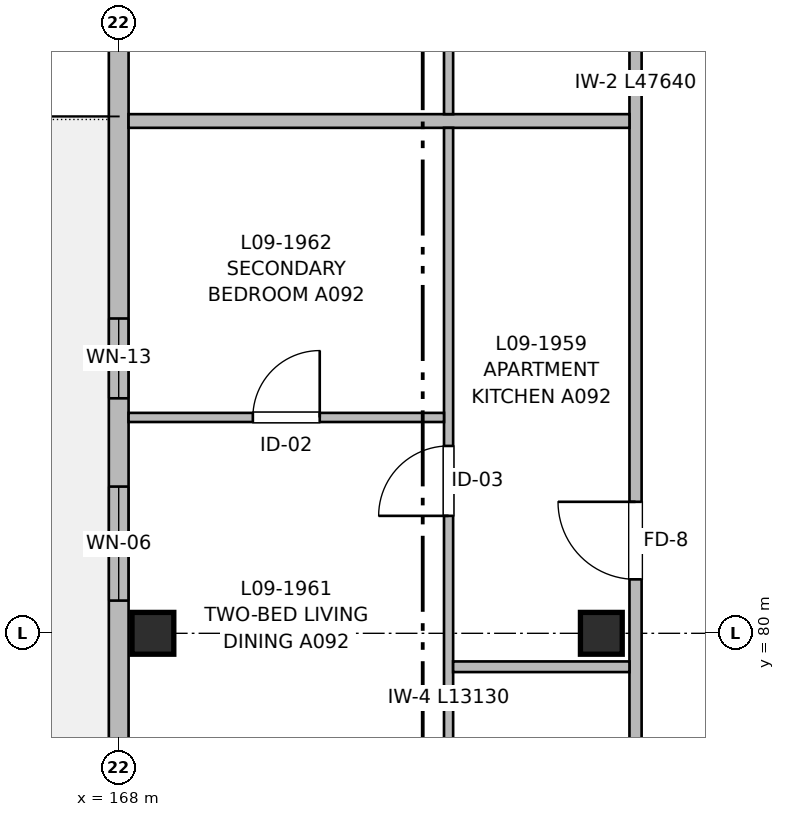
"""IFC4 building model, lengths in metres.
Left out: names, types, materials, properties, quantities, classifications, styles, units other than length and angle.
Written with IfcOpenShell. Run it as: python <this file> out.ifc"""

import sys

from ifc_helpers import new_model, si_unit, direction, frame, frame_2d, origin, origin_2d, place, context, subcontext, project, spatial, rectangle, extrude, element, fill, save


model = new_model("IFC4")
c1 = context("Model", 3, precision=1e-05, world=origin(), true_north=direction((0.0, 1.0)))
c2 = subcontext(c1, "Body", "Model", "MODEL_VIEW")
j1 = project(units=[si_unit("LENGTHUNIT", "METRE"), si_unit("PLANEANGLEUNIT", "RADIAN")], contexts=[c1])
p1 = place(None, origin())
s1 = spatial("IfcSite", under=j1, at=p1, CompositionType="ELEMENT")
p2 = place(p1, origin())
s2 = spatial("IfcBuilding", under=s1, at=p2, CompositionType="ELEMENT")
p3 = place(p2, frame((0.0, 0.0, 29.76)))
s3 = spatial("IfcBuildingStorey", under=s2, at=p3, CompositionType="ELEMENT", Elevation=29.76)
for number, where, z_axis, x_axis in (
    (1, (168.45, 80.0, 0.0), (0.0, 0.0, 1.0), (1.0, 0.0, 0.0)),
    (2, (174.35, 80.0, 0.0), (0.0, 0.0, 1.0), (1.0, 0.0, 0.0)),
):
    element("IfcColumn", number, at=place(p3, frame(where, z_axis=z_axis, x_axis=x_axis)), inside=s3, PredefinedType="COLUMN", context=c2, shape_type="SweptSolid", body=[
        extrude(rectangle(XDim=0.55, YDim=0.55, at=origin_2d()), origin(), (0.0, 0.0, 1.0), 3.2),
    ])
p4 = place(p3, frame((168.0, 59.0, 0.0), z_axis=(0.0, 0.0, 1.0), x_axis=(0.0, 1.0, 0.0)))
e3 = element("IfcWall", 3, at=p4, inside=s3, PredefinedType="SOLIDWALL", context=c2, shape_type="SweptSolid", body=[
    extrude(rectangle(XDim=29.0, YDim=0.26, at=frame_2d((14.5, 0.0))), origin(), (0.0, 0.0, 1.0), 2.98),
])
p5 = place(p4, frame((3.033, 0.0, 0.0)))
e4 = element("IfcOpeningElement", 4, at=p5, cuts=e3, PredefinedType="OPENING", context=c2, shape_type="SweptSolid", body=[
    extrude(rectangle(XDim=1.2, YDim=2.2, at=frame_2d((0.6, 1.1))), frame((0.0, 0.14, 0.0), z_axis=(0.0, -1.0, 0.0), x_axis=(1.0, 0.0, 0.0)), (0.0, 0.0, 1.0), 0.28),
])
p6 = place(p4, frame((6.133, 0.0, 0.77)))
e5 = element("IfcOpeningElement", 5, at=p6, cuts=e3, PredefinedType="OPENING", context=c2, shape_type="SweptSolid", body=[
    extrude(rectangle(XDim=1.65, YDim=1.45, at=frame_2d((0.825, 0.725))), frame((0.0, 0.14, 0.0), z_axis=(0.0, -1.0, 0.0), x_axis=(1.0, 0.0, 0.0)), (0.0, 0.0, 1.0), 0.28),
])
p7 = place(p4, frame((14.675, 0.0, 0.72)))
e6 = element("IfcOpeningElement", 6, at=p7, cuts=e3, PredefinedType="OPENING", context=c2, shape_type="SweptSolid", body=[
    extrude(rectangle(XDim=2.25, YDim=1.5, at=frame_2d((1.125, 0.75))), frame((0.0, 0.14, 0.0), z_axis=(0.0, -1.0, 0.0), x_axis=(1.0, 0.0, 0.0)), (0.0, 0.0, 1.0), 0.28),
])
p8 = place(p4, frame((24.092, 0.0, 0.9)))
e7 = element("IfcOpeningElement", 7, at=p8, cuts=e3, PredefinedType="OPENING", context=c2, shape_type="SweptSolid", body=[
    extrude(rectangle(XDim=1.05, YDim=1.15, at=frame_2d((0.525, 0.575))), frame((0.0, 0.14, 0.0), z_axis=(0.0, -1.0, 0.0), x_axis=(1.0, 0.0, 0.0)), (0.0, 0.0, 1.0), 0.28),
])
p9 = place(p4, frame((21.43, 0.0, 0.82)))
e8 = element("IfcOpeningElement", 8, at=p9, cuts=e3, PredefinedType="OPENING", context=c2, shape_type="SweptSolid", body=[
    extrude(rectangle(XDim=1.5, YDim=1.4, at=frame_2d((0.75, 0.7))), frame((0.0, 0.14, 0.0), z_axis=(0.0, -1.0, 0.0), x_axis=(1.0, 0.0, 0.0)), (0.0, 0.0, 1.0), 0.28),
])
p10 = place(p3, frame((174.8, 59.16, 0.0), z_axis=(0.0, 0.0, 1.0), x_axis=(0.0, 1.0, 0.0)))
e9 = element("IfcWall", 9, at=p10, inside=s3, PredefinedType="PARTITIONING", context=c2, shape_type="SweptSolid", body=[
    extrude(rectangle(XDim=47.64, YDim=0.16, at=frame_2d((23.82, 0.0))), origin(), (0.0, 0.0, 1.0), 2.935),
])
p11 = place(p10, frame((6.34, 0.0, 0.0)))
e10 = element("IfcOpeningElement", 10, at=p11, cuts=e9, PredefinedType="OPENING", context=c2, shape_type="SweptSolid", body=[
    extrude(rectangle(XDim=1.5, YDim=2.2, at=frame_2d((0.75, 1.1))), frame((0.0, 0.09, 0.0), z_axis=(0.0, -1.0, 0.0), x_axis=(1.0, 0.0, 0.0)), (0.0, 0.0, 1.0), 0.18),
])
p12 = place(p10, frame((21.55, 0.0, 0.0)))
e11 = element("IfcOpeningElement", 11, at=p12, cuts=e9, PredefinedType="OPENING", context=c2, shape_type="SweptSolid", body=[
    extrude(rectangle(XDim=1.02, YDim=2.15, at=frame_2d((0.51, 1.075))), frame((0.0, 0.09, 0.0), z_axis=(0.0, -1.0, 0.0), x_axis=(1.0, 0.0, 0.0)), (0.0, 0.0, 1.0), 0.18),
])
p13 = place(p10, frame((33.59, 0.0, 0.0)))
e12 = element("IfcOpeningElement", 12, at=p13, cuts=e9, PredefinedType="OPENING", context=c2, shape_type="SweptSolid", body=[
    extrude(rectangle(XDim=0.98, YDim=2.15, at=frame_2d((0.49, 1.075))), frame((0.0, 0.09, 0.0), z_axis=(0.0, -1.0, 0.0), x_axis=(1.0, 0.0, 0.0)), (0.0, 0.0, 1.0), 0.18),
])
p14 = place(p10, frame((43.74, 0.0, 0.0)))
e13 = element("IfcOpeningElement", 13, at=p14, cuts=e9, PredefinedType="OPENING", context=c2, shape_type="SweptSolid", body=[
    extrude(rectangle(XDim=0.98, YDim=2.15, at=frame_2d((0.49, 1.075))), frame((0.0, 0.09, 0.0), z_axis=(0.0, -1.0, 0.0), x_axis=(1.0, 0.0, 0.0)), (0.0, 0.0, 1.0), 0.18),
])
p15 = place(p3, frame((168.13, 86.74, 0.0), z_axis=(0.0, 0.0, 1.0), x_axis=(1.0, 0.0, 0.0)))
e14 = element("IfcWall", 14, at=p15, inside=s3, PredefinedType="PARTITIONING", context=c2, shape_type="SweptSolid", body=[
    extrude(rectangle(XDim=6.59, YDim=0.18, at=frame_2d((3.295, 0.0))), origin(), (0.0, 0.0, 1.0), 2.935),
])
p16 = place(p3, frame((172.34, 73.52, 0.0), z_axis=(0.0, 0.0, 1.0), x_axis=(0.0, 1.0, 0.0)))
e15 = element("IfcWall", 15, at=p16, inside=s3, PredefinedType="PARTITIONING", context=c2, shape_type="SweptSolid", body=[
    extrude(rectangle(XDim=13.13, YDim=0.12, at=frame_2d((6.565, 0.0))), origin(), (0.0, 0.0, 1.0), 2.935),
])
p17 = place(p16, frame((2.295, 0.0, 0.0)))
e16 = element("IfcOpeningElement", 16, at=p17, cuts=e15, PredefinedType="OPENING", context=c2, shape_type="SweptSolid", body=[
    extrude(rectangle(XDim=0.94, YDim=2.1, at=frame_2d((0.47, 1.05))), frame((0.0, 0.07, 0.0), z_axis=(0.0, -1.0, 0.0), x_axis=(1.0, 0.0, 0.0)), (0.0, 0.0, 1.0), 0.14),
])
p18 = place(p16, frame((8.025, 0.0, 0.0)))
e17 = element("IfcOpeningElement", 17, at=p18, cuts=e15, PredefinedType="OPENING", context=c2, shape_type="SweptSolid", body=[
    extrude(rectangle(XDim=0.92, YDim=2.1, at=frame_2d((0.46, 1.05))), frame((0.0, 0.07, 0.0), z_axis=(0.0, -1.0, 0.0), x_axis=(1.0, 0.0, 0.0)), (0.0, 0.0, 1.0), 0.14),
])
p19 = place(p3, frame((172.4, 79.56, 0.0), z_axis=(0.0, 0.0, 1.0), x_axis=(1.0, 0.0, 0.0)))
e18 = element("IfcWall", 18, at=p19, inside=s3, PredefinedType="PARTITIONING", context=c2, shape_type="SweptSolid", body=[
    extrude(rectangle(XDim=2.32, YDim=0.14, at=frame_2d((1.16, 0.0))), origin(), (0.0, 0.0, 1.0), 2.935),
])
p20 = place(p3, frame((168.13, 82.84, 0.0), z_axis=(0.0, 0.0, 1.0), x_axis=(1.0, 0.0, 0.0)))
e19 = element("IfcWall", 19, at=p20, inside=s3, PredefinedType="PARTITIONING", context=c2, shape_type="SweptSolid", body=[
    extrude(rectangle(XDim=4.15, YDim=0.12, at=frame_2d((2.075, 0.0))), origin(), (0.0, 0.0, 1.0), 2.935),
])
p21 = place(p20, frame((1.635, 0.0, 0.0)))
e20 = element("IfcOpeningElement", 20, at=p21, cuts=e19, PredefinedType="OPENING", context=c2, shape_type="SweptSolid", body=[
    extrude(rectangle(XDim=0.88, YDim=2.1, at=frame_2d((0.44, 1.05))), frame((0.0, 0.07, 0.0), z_axis=(0.0, -1.0, 0.0), x_axis=(1.0, 0.0, 0.0)), (0.0, 0.0, 1.0), 0.14),
])
p22 = place(p3, frame((172.34, 86.83, 0.0), z_axis=(0.0, 0.0, 1.0), x_axis=(0.0, 1.0, 0.0)))
e21 = element("IfcWall", 21, at=p22, inside=s3, PredefinedType="PARTITIONING", context=c2, shape_type="SweptSolid", body=[
    extrude(rectangle(XDim=11.24, YDim=0.12, at=frame_2d((5.62, 0.0))), origin(), (0.0, 0.0, 1.0), 2.935),
])
p23 = place(p22, frame((1.965, 0.0, 0.0)))
e22 = element("IfcOpeningElement", 22, at=p23, cuts=e21, PredefinedType="OPENING", context=c2, shape_type="SweptSolid", body=[
    extrude(rectangle(XDim=0.86, YDim=2.1, at=frame_2d((0.43, 1.05))), frame((0.0, 0.07, 0.0), z_axis=(0.0, -1.0, 0.0), x_axis=(1.0, 0.0, 0.0)), (0.0, 0.0, 1.0), 0.14),
])
p24 = place(p22, frame((6.87, 0.0, 0.0)))
e23 = element("IfcOpeningElement", 23, at=p24, cuts=e21, PredefinedType="OPENING", context=c2, shape_type="SweptSolid", body=[
    extrude(rectangle(XDim=0.92, YDim=2.1, at=frame_2d((0.46, 1.05))), frame((0.0, 0.07, 0.0), z_axis=(0.0, -1.0, 0.0), x_axis=(1.0, 0.0, 0.0)), (0.0, 0.0, 1.0), 0.14),
])
p25 = place(p8, origin())
e24 = element("IfcWindow", 24, at=p25, inside=s3, PartitioningType="SINGLE_PANEL", PredefinedType="WINDOW", context=c2, shape_type="SweptSolid", body=[
    extrude(rectangle(XDim=1.05, YDim=1.15, at=frame_2d((0.525, 0.575))), frame((0.0, 0.03, 0.0), z_axis=(0.0, -1.0, 0.0), x_axis=(1.0, 0.0, 0.0)), (0.0, 0.0, 1.0), 0.06),
])
fill(e7, e24)
p26 = place(p18, origin())
e25 = element("IfcDoor", 25, at=p26, inside=s3, OperationType="SINGLE_SWING_LEFT", PredefinedType="DOOR", context=c2, shape_type="SweptSolid", body=[
    extrude(rectangle(XDim=0.92, YDim=2.1, at=frame_2d((0.46, 1.05))), frame((0.0, 0.025, 0.0), z_axis=(0.0, -1.0, 0.0), x_axis=(1.0, 0.0, 0.0)), (0.0, 0.0, 1.0), 0.05),
])
fill(e17, e25)
p27 = place(p12, origin())
e26 = element("IfcDoor", 26, at=p27, inside=s3, OperationType="SINGLE_SWING_RIGHT", PredefinedType="DOOR", context=c2, shape_type="SweptSolid", body=[
    extrude(rectangle(XDim=1.02, YDim=2.15, at=frame_2d((0.51, 1.075))), frame((0.0, 0.025, 0.0), z_axis=(0.0, -1.0, 0.0), x_axis=(1.0, 0.0, 0.0)), (0.0, 0.0, 1.0), 0.05),
])
fill(e11, e26)
p28 = place(p21, origin())
e27 = element("IfcDoor", 27, at=p28, inside=s3, OperationType="SINGLE_SWING_RIGHT", PredefinedType="DOOR", context=c2, shape_type="SweptSolid", body=[
    extrude(rectangle(XDim=0.88, YDim=2.1, at=frame_2d((0.44, 1.05))), frame((0.0, 0.025, 0.0), z_axis=(0.0, -1.0, 0.0), x_axis=(1.0, 0.0, 0.0)), (0.0, 0.0, 1.0), 0.05),
])
fill(e20, e27)
p29 = place(p9, origin())
e28 = element("IfcWindow", 28, at=p29, inside=s3, PartitioningType="SINGLE_PANEL", PredefinedType="WINDOW", context=c2, shape_type="SweptSolid", body=[
    extrude(rectangle(XDim=1.5, YDim=1.4, at=frame_2d((0.75, 0.7))), frame((0.0, 0.03, 0.0), z_axis=(0.0, -1.0, 0.0), x_axis=(1.0, 0.0, 0.0)), (0.0, 0.0, 1.0), 0.06),
])
fill(e8, e28)
save(model, sys.argv[1])
